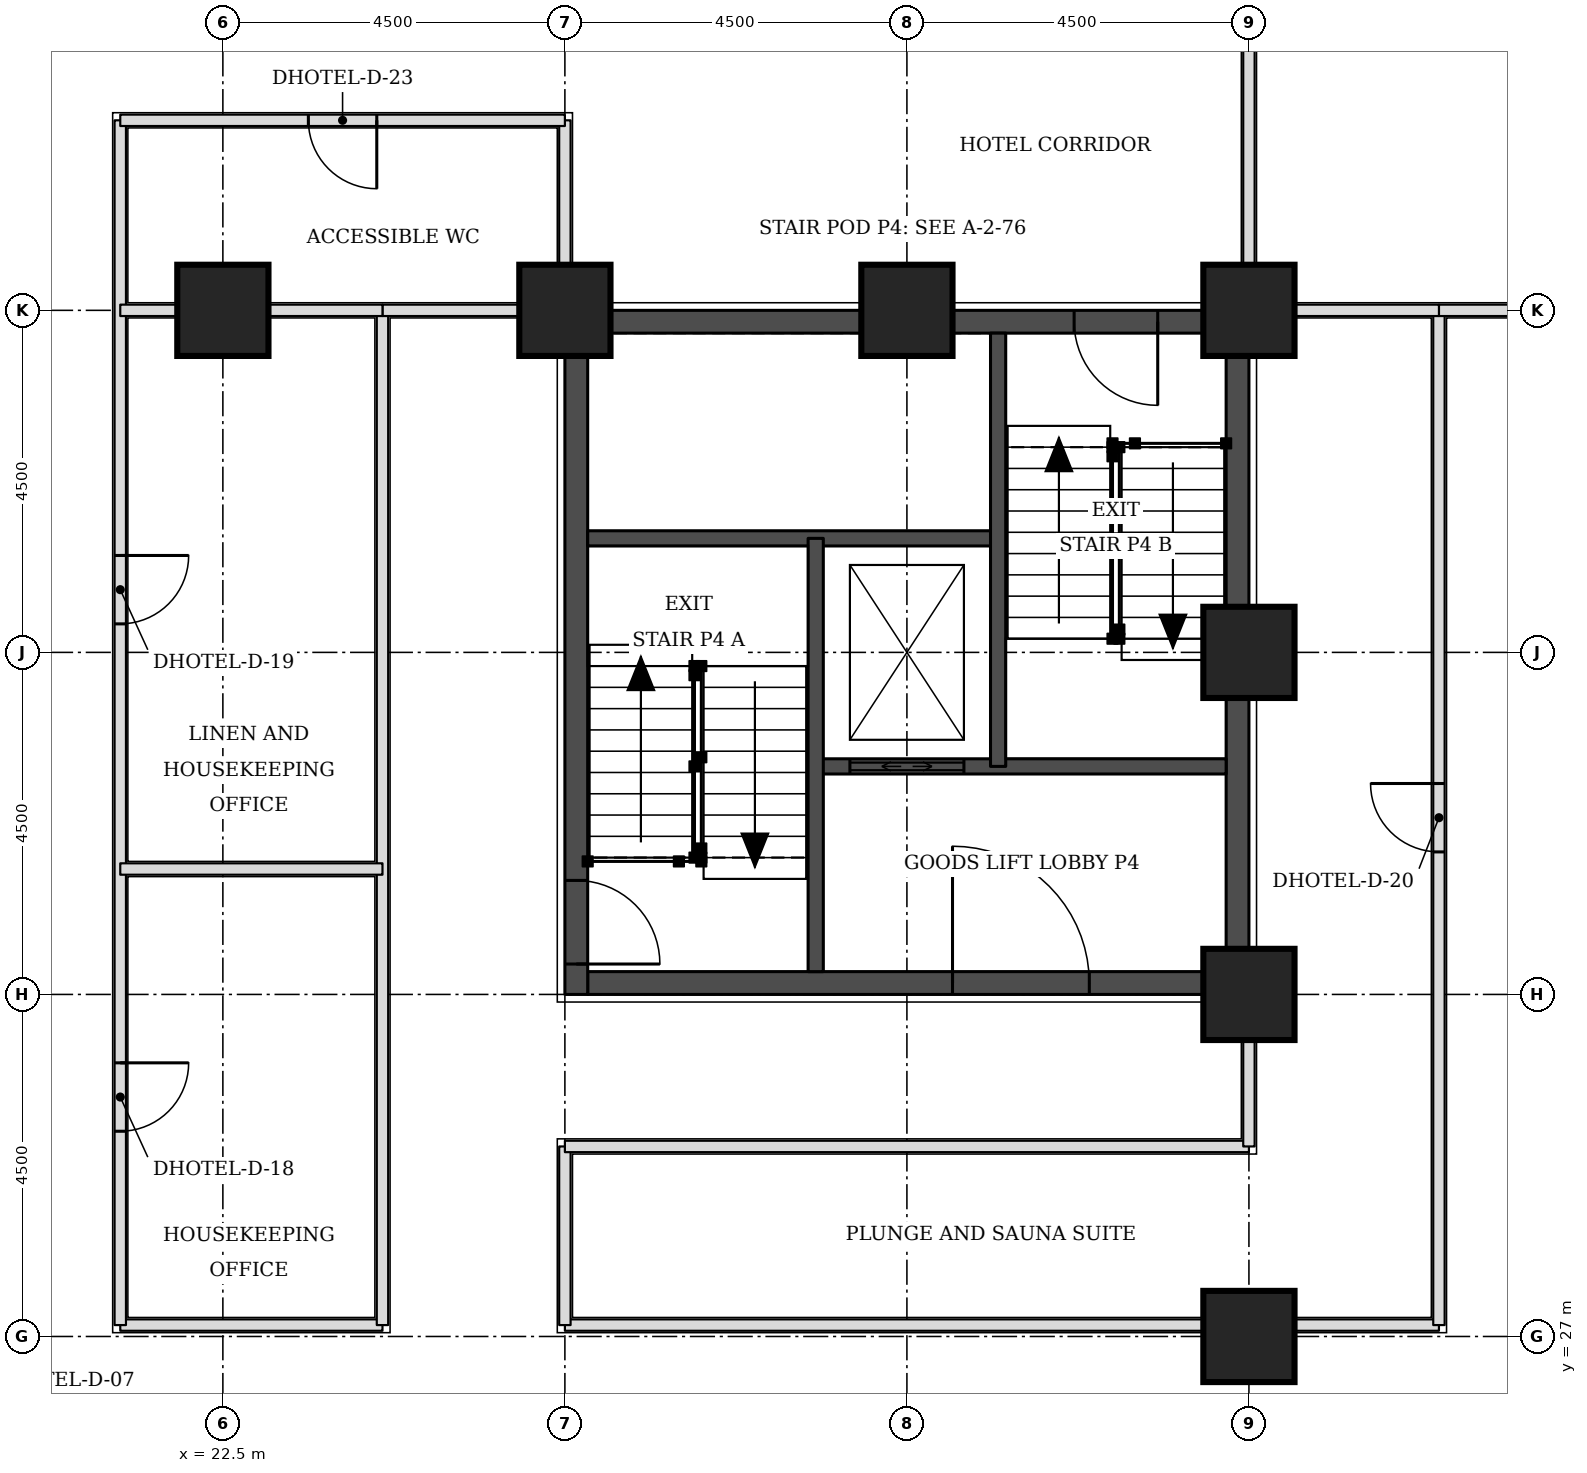
"""IFC4 building model, lengths in metres.
Left out: names, types, materials, properties, quantities, classifications, styles, units other than length and angle.
Written with IfcOpenShell. Run it as: python <this file> out.ifc"""

import sys

from ifc_helpers import new_model, si_unit, direction, frame, frame_2d, origin, origin_2d, place, context, subcontext, project, spatial, rectangle, extrude, element, fill, save


model = new_model("IFC4")
c1 = context("Model", 3, precision=1e-05, world=origin(), true_north=direction((0.0, 1.0)))
c2 = subcontext(c1, "Body", "Model", "MODEL_VIEW")
j1 = project(units=[si_unit("LENGTHUNIT", "METRE"), si_unit("PLANEANGLEUNIT", "RADIAN")], contexts=[c1])
p1 = place(None, origin())
s1 = spatial("IfcSite", under=j1, at=p1, CompositionType="ELEMENT")
p2 = place(p1, origin())
s2 = spatial("IfcBuilding", under=s1, at=p2, CompositionType="ELEMENT")
p3 = place(p2, frame((0.0, 0.0, 36.3)))
s3 = spatial("IfcBuildingStorey", under=s2, at=p3, CompositionType="ELEMENT", Elevation=36.3)
for number, where, z_axis, x_axis in (
    (1, (36.0, 27.0, 0.0), (0.0, 0.0, 1.0), (1.0, 0.0, 0.0)),
    (2, (36.0, 31.5, 0.0), (0.0, 0.0, 1.0), (1.0, 0.0, 0.0)),
    (3, (36.0, 36.0, 0.0), (0.0, 0.0, 1.0), (1.0, 0.0, 0.0)),
    (4, (22.5, 40.5, 0.0), (0.0, 0.0, 1.0), (1.0, 0.0, 0.0)),
    (5, (27.0, 40.5, 0.0), (0.0, 0.0, 1.0), (1.0, 0.0, 0.0)),
    (6, (31.5, 40.5, 0.0), (0.0, 0.0, 1.0), (1.0, 0.0, 0.0)),
    (7, (36.0, 40.5, 0.0), (0.0, 0.0, 1.0), (1.0, 0.0, 0.0)),
):
    element("IfcColumn", number, at=place(p3, frame(where, z_axis=z_axis, x_axis=x_axis)), inside=s3, PredefinedType="COLUMN", context=c2, shape_type="SweptSolid", body=[
        extrude(rectangle(XDim=1.2, YDim=1.2, at=origin_2d()), origin(), (0.0, 0.0, 1.0), 3.3),
    ])
p4 = place(p3, frame((27.3, 31.65, 0.0), z_axis=(0.0, 0.0, 1.0), x_axis=(1.0, 0.0, 0.0)))
e8 = element("IfcWall", 8, at=p4, inside=s3, PredefinedType="SHEAR", context=c2, shape_type="SweptSolid", body=[
    extrude(rectangle(XDim=8.4, YDim=0.3, at=frame_2d((4.2, 0.0))), origin(), (0.0, 0.0, 1.0), 3.3),
])
p5 = place(p4, frame((4.8, 0.0, 0.0)))
e9 = element("IfcOpeningElement", 9, at=p5, cuts=e8, PredefinedType="OPENING", context=c2, shape_type="SweptSolid", body=[
    extrude(rectangle(XDim=1.8, YDim=2.1, at=frame_2d((0.9, 1.05))), frame((0.0, 0.16, 0.0), z_axis=(0.0, -1.0, 0.0), x_axis=(1.0, 0.0, 0.0)), (0.0, 0.0, 1.0), 0.32),
])
p6 = place(p3, frame((27.3, 40.35, 0.0), z_axis=(0.0, 0.0, 1.0), x_axis=(1.0, 0.0, 0.0)))
e10 = element("IfcWall", 10, at=p6, inside=s3, PredefinedType="SHEAR", context=c2, shape_type="SweptSolid", body=[
    extrude(rectangle(XDim=8.4, YDim=0.3, at=frame_2d((4.2, 0.0))), origin(), (0.0, 0.0, 1.0), 3.3),
])
p7 = place(p6, frame((6.4, 0.0, 0.0)))
e11 = element("IfcOpeningElement", 11, at=p7, cuts=e10, PredefinedType="OPENING", context=c2, shape_type="SweptSolid", body=[
    extrude(rectangle(XDim=1.1, YDim=2.1, at=frame_2d((0.55, 1.05))), frame((0.0, 0.16, 0.0), z_axis=(0.0, -1.0, 0.0), x_axis=(1.0, 0.0, 0.0)), (0.0, 0.0, 1.0), 0.32),
])
p8 = place(p3, frame((27.15, 31.5, 0.0), z_axis=(0.0, 0.0, 1.0), x_axis=(0.0, 1.0, 0.0)))
e12 = element("IfcWall", 12, at=p8, inside=s3, PredefinedType="SHEAR", context=c2, shape_type="SweptSolid", body=[
    extrude(rectangle(XDim=9.0, YDim=0.3, at=frame_2d((4.5, 0.0))), origin(), (0.0, 0.0, 1.0), 3.3),
])
p9 = place(p8, frame((0.4, 0.0, 0.0)))
e13 = element("IfcOpeningElement", 13, at=p9, cuts=e12, PredefinedType="OPENING", context=c2, shape_type="SweptSolid", body=[
    extrude(rectangle(XDim=1.1, YDim=2.1, at=frame_2d((0.55, 1.05))), frame((0.0, 0.16, 0.0), z_axis=(0.0, -1.0, 0.0), x_axis=(1.0, 0.0, 0.0)), (0.0, 0.0, 1.0), 0.32),
])
p10 = place(p3, frame((35.85, 31.5, 0.0), z_axis=(0.0, 0.0, 1.0), x_axis=(0.0, 1.0, 0.0)))
e14 = element("IfcWall", 14, at=p10, inside=s3, PredefinedType="SHEAR", context=c2, shape_type="SweptSolid", body=[
    extrude(rectangle(XDim=9.0, YDim=0.3, at=frame_2d((4.5, 0.0))), origin(), (0.0, 0.0, 1.0), 3.3),
])
p11 = place(p3, frame((21.15, 27.15, 0.0), z_axis=(0.0, 0.0, 1.0), x_axis=(1.0, 0.0, 0.0)))
e15 = element("IfcWall", 15, at=p11, inside=s3, PredefinedType="PARTITIONING", context=c2, shape_type="SweptSolid", body=[
    extrude(rectangle(XDim=3.45, YDim=0.15, at=frame_2d((1.725, 0.0))), origin(), (0.0, 0.0, 1.0), 3.08),
])
p12 = place(p3, frame((21.15, 27.15, 0.0), z_axis=(0.0, 0.0, 1.0), x_axis=(0.0, 1.0, 0.0)))
e16 = element("IfcWall", 16, at=p12, inside=s3, PredefinedType="PARTITIONING", context=c2, shape_type="SweptSolid", body=[
    extrude(rectangle(XDim=15.85, YDim=0.15, at=frame_2d((7.925, 0.0))), origin(), (0.0, 0.0, 1.0), 3.08),
])
p13 = place(p12, frame((2.55, 0.0, 0.0)))
e17 = element("IfcOpeningElement", 17, at=p13, cuts=e16, PredefinedType="OPENING", context=c2, shape_type="SweptSolid", body=[
    extrude(rectangle(XDim=0.9, YDim=2.1, at=frame_2d((0.45, 1.05))), frame((0.0, 0.085, 0.0), z_axis=(0.0, -1.0, 0.0), x_axis=(1.0, 0.0, 0.0)), (0.0, 0.0, 1.0), 0.17),
])
p14 = place(p12, frame((9.225, 0.0, 0.0)))
e18 = element("IfcOpeningElement", 18, at=p14, cuts=e16, PredefinedType="OPENING", context=c2, shape_type="SweptSolid", body=[
    extrude(rectangle(XDim=0.9, YDim=2.1, at=frame_2d((0.45, 1.05))), frame((0.0, 0.085, 0.0), z_axis=(0.0, -1.0, 0.0), x_axis=(1.0, 0.0, 0.0)), (0.0, 0.0, 1.0), 0.17),
])
p15 = place(p3, frame((24.6, 27.15, 0.0), z_axis=(0.0, 0.0, 1.0), x_axis=(0.0, 1.0, 0.0)))
e19 = element("IfcWall", 19, at=p15, inside=s3, PredefinedType="PARTITIONING", context=c2, shape_type="SweptSolid", body=[
    extrude(rectangle(XDim=13.35, YDim=0.15, at=frame_2d((6.675, 0.0))), origin(), (0.0, 0.0, 1.0), 3.08),
])
p16 = place(p3, frame((27.0, 27.15, 0.0), z_axis=(0.0, 0.0, 1.0), x_axis=(1.0, 0.0, 0.0)))
e20 = element("IfcWall", 20, at=p16, inside=s3, PredefinedType="PARTITIONING", context=c2, shape_type="SweptSolid", body=[
    extrude(rectangle(XDim=11.5, YDim=0.15, at=frame_2d((5.75, 0.0))), origin(), (0.0, 0.0, 1.0), 3.08),
])
p17 = place(p3, frame((27.0, 27.15, 0.0), z_axis=(0.0, 0.0, 1.0), x_axis=(0.0, 1.0, 0.0)))
e21 = element("IfcWall", 21, at=p17, inside=s3, PredefinedType="PARTITIONING", context=c2, shape_type="SweptSolid", body=[
    extrude(rectangle(XDim=2.35, YDim=0.15, at=frame_2d((1.175, 0.0))), origin(), (0.0, 0.0, 1.0), 3.08),
])
p18 = place(p3, frame((38.5, 27.15, 0.0), z_axis=(0.0, 0.0, 1.0), x_axis=(0.0, 1.0, 0.0)))
e22 = element("IfcWall", 22, at=p18, inside=s3, PredefinedType="PARTITIONING", context=c2, shape_type="SweptSolid", body=[
    extrude(rectangle(XDim=13.35, YDim=0.15, at=frame_2d((6.675, 0.0))), origin(), (0.0, 0.0, 1.0), 3.08),
])
p19 = place(p18, frame((6.225, 0.0, 0.0)))
e23 = element("IfcOpeningElement", 23, at=p19, cuts=e22, PredefinedType="OPENING", context=c2, shape_type="SweptSolid", body=[
    extrude(rectangle(XDim=0.9, YDim=2.1, at=frame_2d((0.45, 1.05))), frame((0.0, 0.085, 0.0), z_axis=(0.0, -1.0, 0.0), x_axis=(1.0, 0.0, 0.0)), (0.0, 0.0, 1.0), 0.17),
])
p20 = place(p3, frame((27.0, 29.5, 0.0), z_axis=(0.0, 0.0, 1.0), x_axis=(1.0, 0.0, 0.0)))
e24 = element("IfcWall", 24, at=p20, inside=s3, PredefinedType="PARTITIONING", context=c2, shape_type="SweptSolid", body=[
    extrude(rectangle(XDim=9.0, YDim=0.15, at=frame_2d((4.5, 0.0))), origin(), (0.0, 0.0, 1.0), 3.08),
])
p21 = place(p3, frame((36.0, 29.5, 0.0), z_axis=(0.0, 0.0, 1.0), x_axis=(0.0, 1.0, 0.0)))
e25 = element("IfcWall", 25, at=p21, inside=s3, PredefinedType="PARTITIONING", context=c2, shape_type="SweptSolid", body=[
    extrude(rectangle(XDim=1.95, YDim=0.15, at=frame_2d((0.975, 0.0))), origin(), (0.0, 0.0, 1.0), 2.33),
])
p22 = place(p3, frame((24.6, 40.5, 0.0), z_axis=(0.0, 0.0, 1.0), x_axis=(1.0, 0.0, 0.0)))
e26 = element("IfcWall", 26, at=p22, inside=s3, PredefinedType="PARTITIONING", context=c2, shape_type="SweptSolid", body=[
    extrude(rectangle(XDim=2.35, YDim=0.15, at=frame_2d((1.175, 0.0))), origin(), (0.0, 0.0, 1.0), 2.33),
])
p23 = place(p3, frame((38.5, 40.5, 0.0), z_axis=(0.0, 0.0, 1.0), x_axis=(1.0, 0.0, 0.0)))
e27 = element("IfcWall", 27, at=p23, inside=s3, PredefinedType="PARTITIONING", context=c2, shape_type="SweptSolid", body=[
    extrude(rectangle(XDim=1.95, YDim=0.15, at=frame_2d((0.975, 0.0))), origin(), (0.0, 0.0, 1.0), 2.33),
])
p24 = place(p3, frame((27.0, 40.55, 0.0), z_axis=(0.0, 0.0, 1.0), x_axis=(0.0, 1.0, 0.0)))
e28 = element("IfcWall", 28, at=p24, inside=s3, PredefinedType="PARTITIONING", context=c2, shape_type="SweptSolid", body=[
    extrude(rectangle(XDim=2.45, YDim=0.15, at=frame_2d((1.225, 0.0))), origin(), (0.0, 0.0, 1.0), 3.08),
])
p25 = place(p3, frame((36.0, 40.55, 0.0), z_axis=(0.0, 0.0, 1.0), x_axis=(0.0, 1.0, 0.0)))
e29 = element("IfcWall", 29, at=p25, inside=s3, PredefinedType="PARTITIONING", context=c2, shape_type="SweptSolid", body=[
    extrude(rectangle(XDim=4.4, YDim=0.15, at=frame_2d((2.2, 0.0))), origin(), (0.0, 0.0, 1.0), 2.33),
])
p26 = place(p3, frame((21.15, 43.0, 0.0), z_axis=(0.0, 0.0, 1.0), x_axis=(1.0, 0.0, 0.0)))
e30 = element("IfcWall", 30, at=p26, inside=s3, PredefinedType="PARTITIONING", context=c2, shape_type="SweptSolid", body=[
    extrude(rectangle(XDim=5.85, YDim=0.15, at=frame_2d((2.925, 0.0))), origin(), (0.0, 0.0, 1.0), 3.08),
])
p27 = place(p26, frame((2.475, 0.0, 0.0)))
e31 = element("IfcOpeningElement", 31, at=p27, cuts=e30, PredefinedType="OPENING", context=c2, shape_type="SweptSolid", body=[
    extrude(rectangle(XDim=0.9, YDim=2.1, at=frame_2d((0.45, 1.05))), frame((0.0, 0.085, 0.0), z_axis=(0.0, -1.0, 0.0), x_axis=(1.0, 0.0, 0.0)), (0.0, 0.0, 1.0), 0.17),
])
p28 = place(p3, frame((21.15, 33.15, 0.0), z_axis=(0.0, 0.0, 1.0), x_axis=(1.0, 0.0, 0.0)))
e32 = element("IfcWall", 32, at=p28, inside=s3, PredefinedType="PARTITIONING", context=c2, shape_type="SweptSolid", body=[
    extrude(rectangle(XDim=3.45, YDim=0.15, at=frame_2d((1.725, 0.0))), origin(), (0.0, 0.0, 1.0), 3.08),
])
p29 = place(p3, frame((21.15, 40.5, 0.0), z_axis=(0.0, 0.0, 1.0), x_axis=(1.0, 0.0, 0.0)))
e33 = element("IfcWall", 33, at=p29, inside=s3, PredefinedType="PARTITIONING", context=c2, shape_type="SweptSolid", body=[
    extrude(rectangle(XDim=3.45, YDim=0.15, at=frame_2d((1.725, 0.0))), origin(), (0.0, 0.0, 1.0), 2.33),
])
p30 = place(p3, frame((36.05, 40.5, 0.0), z_axis=(0.0, 0.0, 1.0), x_axis=(1.0, 0.0, 0.0)))
e34 = element("IfcWall", 34, at=p30, inside=s3, PredefinedType="PARTITIONING", context=c2, shape_type="SweptSolid", body=[
    extrude(rectangle(XDim=2.45, YDim=0.15, at=frame_2d((1.225, 0.0))), origin(), (0.0, 0.0, 1.0), 2.33),
])
p31 = place(p3, frame((30.3, 34.5, 0.0), z_axis=(0.0, 0.0, 1.0), x_axis=(1.0, 0.0, 0.0)))
e35 = element("IfcWall", 35, at=p31, inside=s3, PredefinedType="SOLIDWALL", context=c2, shape_type="SweptSolid", body=[
    extrude(rectangle(XDim=5.4, YDim=0.2, at=frame_2d((2.7, 0.0))), origin(), (0.0, 0.0, 1.0), 3.08),
])
p32 = place(p31, frame((0.45, 0.0, 0.0)))
e36 = element("IfcOpeningElement", 36, at=p32, cuts=e35, PredefinedType="OPENING", context=c2, shape_type="SweptSolid", body=[
    extrude(rectangle(XDim=1.5, YDim=2.1, at=frame_2d((0.75, 1.05))), frame((0.0, 0.11, 0.0), z_axis=(0.0, -1.0, 0.0), x_axis=(1.0, 0.0, 0.0)), (0.0, 0.0, 1.0), 0.22),
])
p33 = place(p3, frame((27.3, 37.5, 0.0), z_axis=(0.0, 0.0, 1.0), x_axis=(1.0, 0.0, 0.0)))
e37 = element("IfcWall", 37, at=p33, inside=s3, PredefinedType="SOLIDWALL", context=c2, shape_type="SweptSolid", body=[
    extrude(rectangle(XDim=5.4, YDim=0.2, at=frame_2d((2.7, 0.0))), origin(), (0.0, 0.0, 1.0), 3.08),
])
for number, where, z_axis, x_axis in (
    (38, (30.3, 31.8, 0.0), (0.0, 0.0, 1.0), (0.0, 1.0, 0.0)),
    (39, (32.7, 34.5, 0.0), (0.0, 0.0, 1.0), (0.0, 1.0, 0.0)),
):
    element("IfcWall", number, at=place(p3, frame(where, z_axis=z_axis, x_axis=x_axis)), inside=s3, PredefinedType="SOLIDWALL", context=c2, shape_type="SweptSolid", body=[
        extrude(rectangle(XDim=5.7, YDim=0.2, at=frame_2d((2.85, 0.0))), origin(), (0.0, 0.0, 1.0), 3.08),
    ])
p34 = place(p13, frame((0.9, 0.0, 0.0), z_axis=(0.0, 0.0, 1.0), x_axis=(-1.0, 0.0, 0.0)))
e40 = element("IfcDoor", 40, at=p34, inside=s3, OperationType="SINGLE_SWING_LEFT", PredefinedType="DOOR", context=c2, shape_type="SweptSolid", body=[
    extrude(rectangle(XDim=0.9, YDim=2.1, at=frame_2d((0.45, 1.05))), frame((0.0, 0.025, 0.0), z_axis=(0.0, -1.0, 0.0), x_axis=(1.0, 0.0, 0.0)), (0.0, 0.0, 1.0), 0.05),
])
fill(e17, e40)
p35 = place(p14, frame((0.9, 0.0, 0.0), z_axis=(0.0, 0.0, 1.0), x_axis=(-1.0, 0.0, 0.0)))
e41 = element("IfcDoor", 41, at=p35, inside=s3, OperationType="SINGLE_SWING_LEFT", PredefinedType="DOOR", context=c2, shape_type="SweptSolid", body=[
    extrude(rectangle(XDim=0.9, YDim=2.1, at=frame_2d((0.45, 1.05))), frame((0.0, 0.025, 0.0), z_axis=(0.0, -1.0, 0.0), x_axis=(1.0, 0.0, 0.0)), (0.0, 0.0, 1.0), 0.05),
])
fill(e18, e41)
p36 = place(p19, origin())
e42 = element("IfcDoor", 42, at=p36, inside=s3, OperationType="SINGLE_SWING_RIGHT", PredefinedType="DOOR", context=c2, shape_type="SweptSolid", body=[
    extrude(rectangle(XDim=0.9, YDim=2.1, at=frame_2d((0.45, 1.05))), frame((0.0, 0.025, 0.0), z_axis=(0.0, -1.0, 0.0), x_axis=(1.0, 0.0, 0.0)), (0.0, 0.0, 1.0), 0.05),
])
fill(e23, e42)
p37 = place(p27, frame((0.9, 0.0, 0.0), z_axis=(0.0, 0.0, 1.0), x_axis=(-1.0, 0.0, 0.0)))
e43 = element("IfcDoor", 43, at=p37, inside=s3, OperationType="SINGLE_SWING_LEFT", PredefinedType="DOOR", context=c2, shape_type="SweptSolid", body=[
    extrude(rectangle(XDim=0.9, YDim=2.1, at=frame_2d((0.45, 1.05))), frame((0.0, 0.025, 0.0), z_axis=(0.0, -1.0, 0.0), x_axis=(1.0, 0.0, 0.0)), (0.0, 0.0, 1.0), 0.05),
])
fill(e31, e43)
p38 = place(p9, frame((1.1, 0.0, 0.0), z_axis=(0.0, 0.0, 1.0), x_axis=(-1.0, 0.0, 0.0)))
e44 = element("IfcDoor", 44, at=p38, inside=s3, OperationType="SINGLE_SWING_RIGHT", PredefinedType="DOOR", context=c2, shape_type="SweptSolid", body=[
    extrude(rectangle(XDim=1.1, YDim=2.1, at=frame_2d((0.55, 1.05))), frame((0.0, 0.025, 0.0), z_axis=(0.0, -1.0, 0.0), x_axis=(1.0, 0.0, 0.0)), (0.0, 0.0, 1.0), 0.05),
])
fill(e13, e44)
p39 = place(p7, frame((1.1, 0.0, 0.0), z_axis=(0.0, 0.0, 1.0), x_axis=(-1.0, 0.0, 0.0)))
e45 = element("IfcDoor", 45, at=p39, inside=s3, OperationType="SINGLE_SWING_LEFT", PredefinedType="DOOR", context=c2, shape_type="SweptSolid", body=[
    extrude(rectangle(XDim=1.1, YDim=2.1, at=frame_2d((0.55, 1.05))), frame((0.0, 0.025, 0.0), z_axis=(0.0, -1.0, 0.0), x_axis=(1.0, 0.0, 0.0)), (0.0, 0.0, 1.0), 0.05),
])
fill(e11, e45)
p40 = place(p32, origin())
e46 = element("IfcDoor", 46, at=p40, inside=s3, OperationType="DOUBLE_DOOR_SLIDING", PredefinedType="DOOR", context=c2, shape_type="SweptSolid", body=[
    extrude(rectangle(XDim=1.5, YDim=2.1, at=frame_2d((0.75, 1.05))), frame((0.0, 0.025, 0.0), z_axis=(0.0, -1.0, 0.0), x_axis=(1.0, 0.0, 0.0)), (0.0, 0.0, 1.0), 0.05),
])
fill(e36, e46)
p41 = place(p5, origin())
e47 = element("IfcDoor", 47, at=p41, inside=s3, OperationType="SINGLE_SWING_LEFT", PredefinedType="DOOR", context=c2, shape_type="SweptSolid", body=[
    extrude(rectangle(XDim=1.8, YDim=2.1, at=frame_2d((0.9, 1.05))), frame((0.0, 0.025, 0.0), z_axis=(0.0, -1.0, 0.0), x_axis=(1.0, 0.0, 0.0)), (0.0, 0.0, 1.0), 0.05),
])
fill(e9, e47)
save(model, sys.argv[1])
